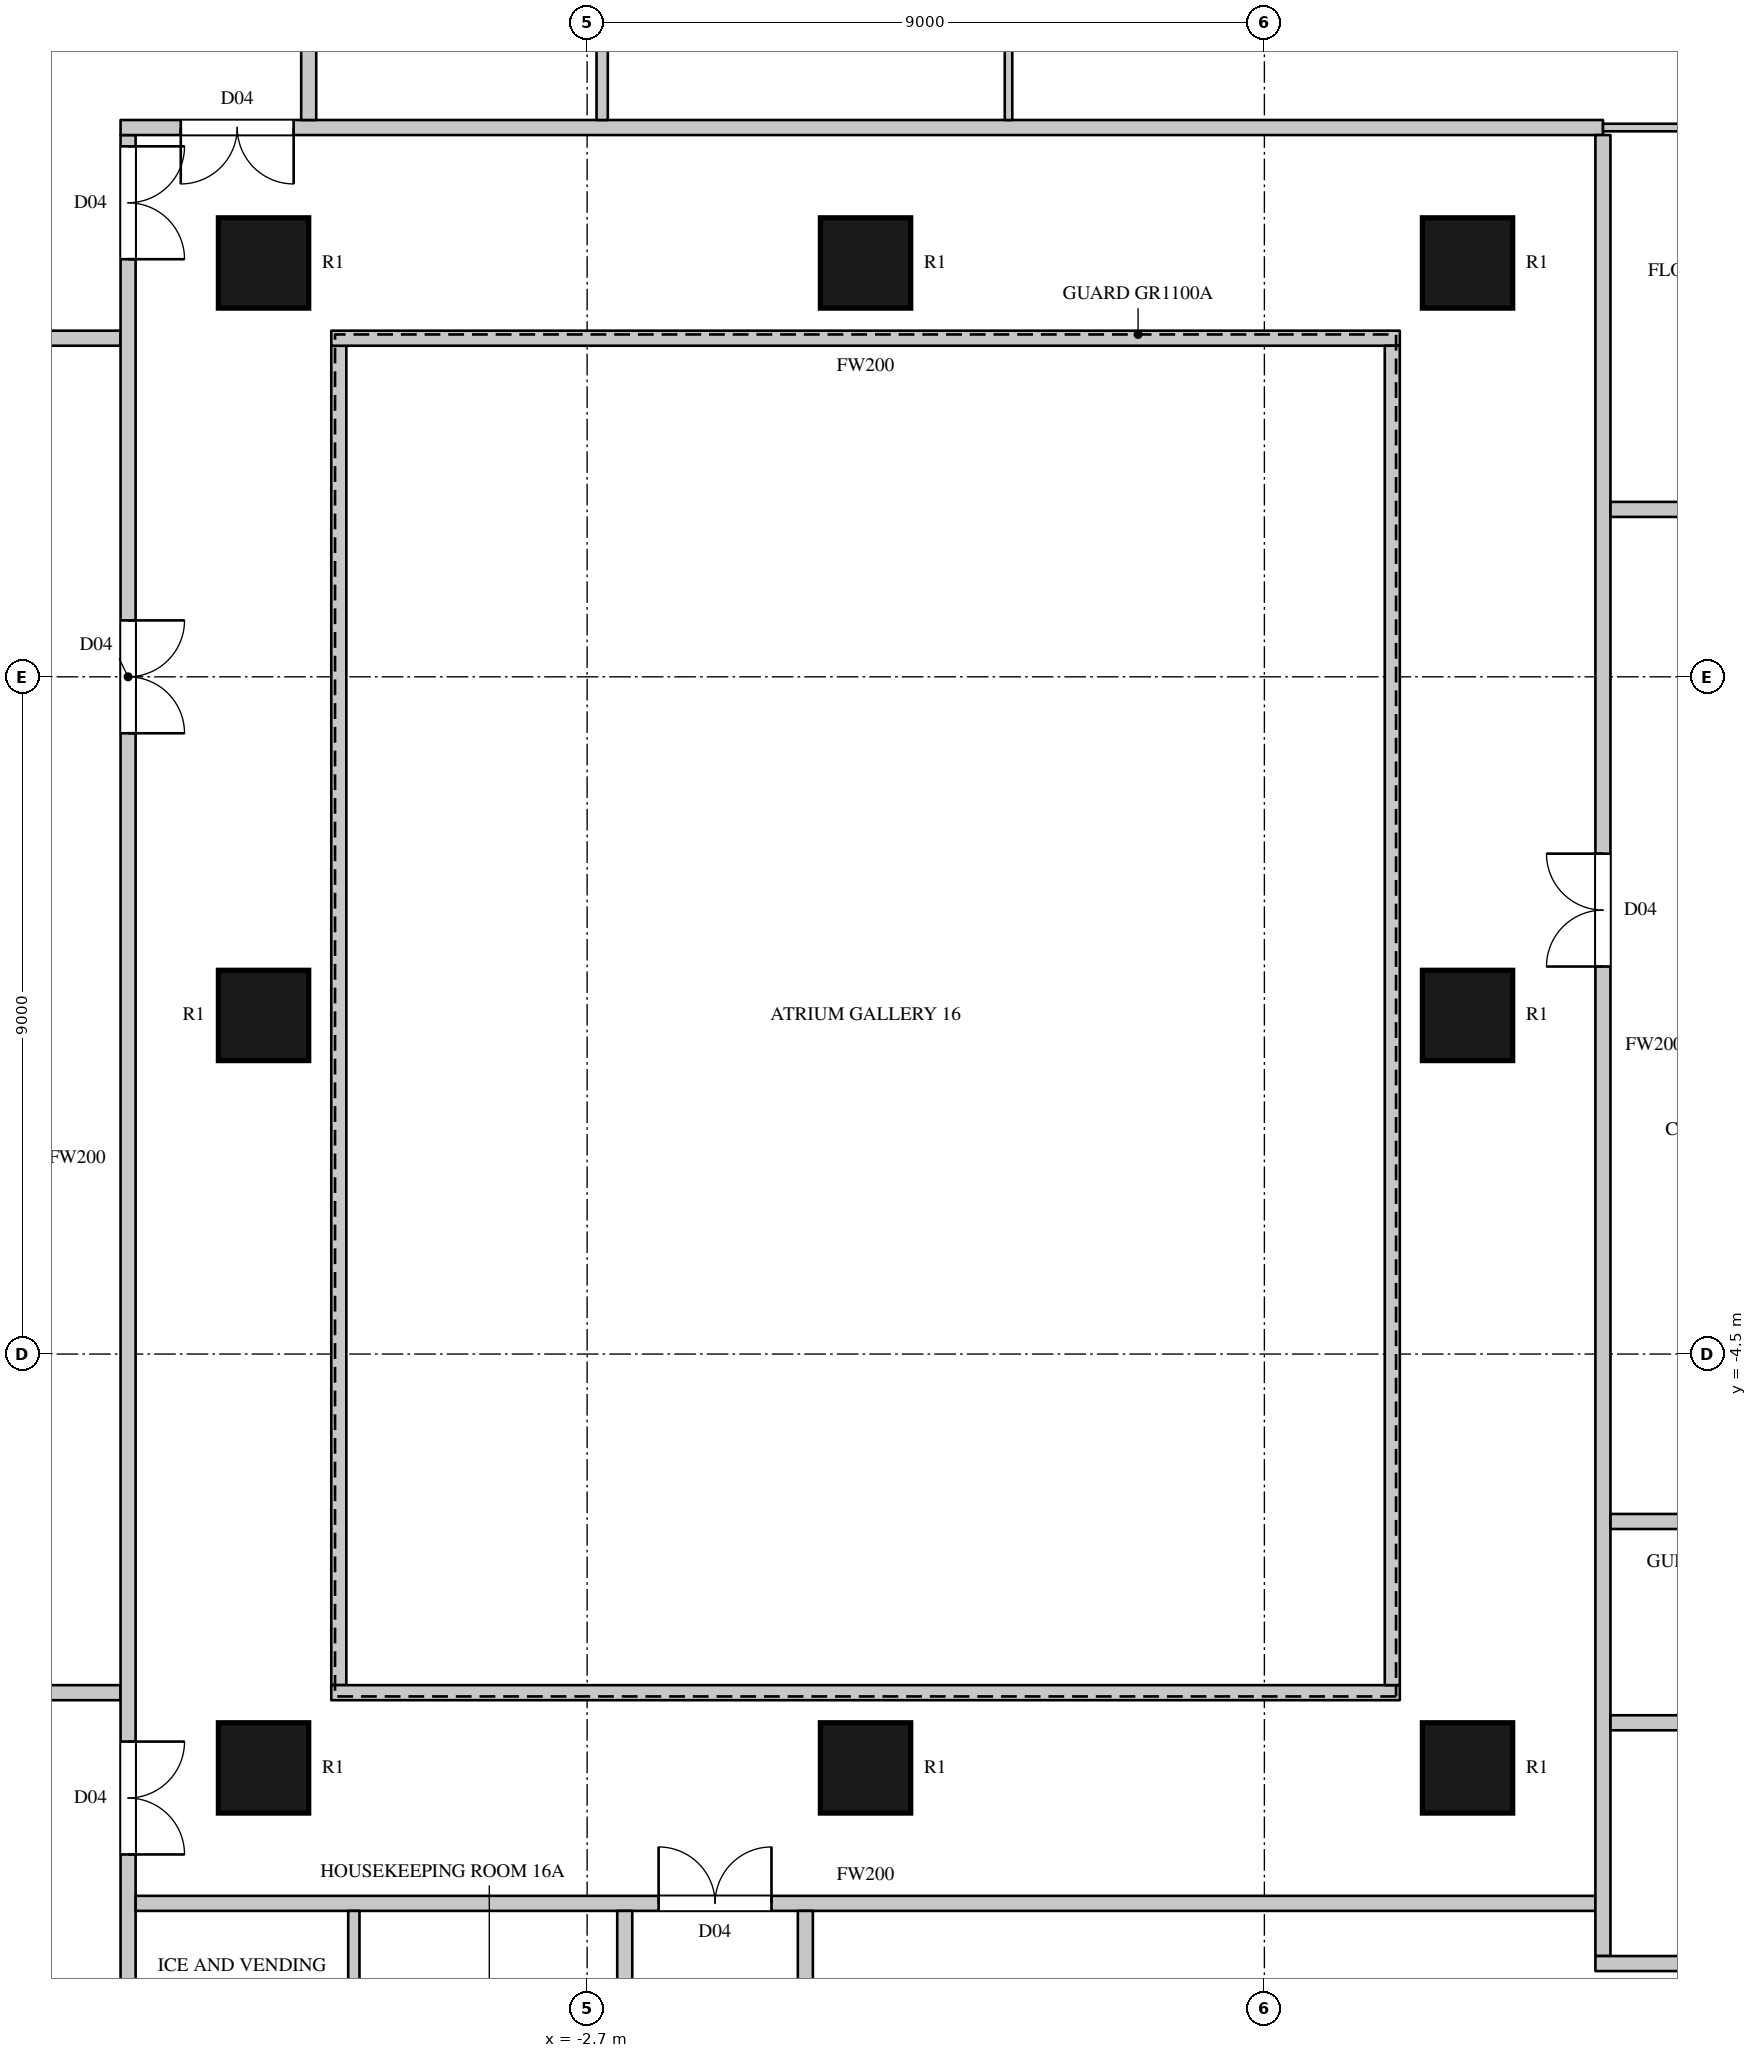
"""IFC4 building model, lengths in metres.
Left out: names, types, materials, properties, quantities, classifications, styles, units other than length and angle.
Written with IfcOpenShell. Run it as: python <this file> out.ifc"""

import sys

from ifc_helpers import new_model, si_unit, direction, frame, frame_2d, origin, origin_2d, place, context, subcontext, project, spatial, rectangle, circle, extrude, element, fill, save


model = new_model("IFC4")
c1 = context("Model", 3, precision=1e-05, world=origin(), true_north=direction((0.0, 1.0)))
c2 = subcontext(c1, "Body", "Model", "MODEL_VIEW")
j1 = project(units=[si_unit("LENGTHUNIT", "METRE"), si_unit("PLANEANGLEUNIT", "RADIAN")], contexts=[c1])
p1 = place(None, origin())
s1 = spatial("IfcSite", under=j1, at=p1, CompositionType="ELEMENT")
p2 = place(p1, origin())
s2 = spatial("IfcBuilding", under=s1, at=p2, CompositionType="ELEMENT")
p3 = place(p2, frame((0.0, 0.0, 87.9)))
s3 = spatial("IfcBuildingStorey", under=s2, at=p3, CompositionType="ELEMENT", Elevation=87.9)
for number, where, z_axis, x_axis in (
    (1, (-7.0, -10.0, 0.0), (0.0, 0.0, 1.0), (1.0, 0.0, 0.0)),
    (2, (-7.0, 0.0, 0.0), (0.0, 0.0, 1.0), (1.0, 0.0, 0.0)),
    (3, (-7.0, 10.0, 0.0), (0.0, 0.0, 1.0), (1.0, 0.0, 0.0)),
    (4, (1.0, -10.0, 0.0), (0.0, 0.0, 1.0), (1.0, 0.0, 0.0)),
    (5, (1.0, 10.0, 0.0), (0.0, 0.0, 1.0), (1.0, 0.0, 0.0)),
    (6, (9.0, -10.0, 0.0), (0.0, 0.0, 1.0), (1.0, 0.0, 0.0)),
    (7, (9.0, 0.0, 0.0), (0.0, 0.0, 1.0), (1.0, 0.0, 0.0)),
    (8, (9.0, 10.0, 0.0), (0.0, 0.0, 1.0), (1.0, 0.0, 0.0)),
):
    element("IfcColumn", number, at=place(p3, frame(where, z_axis=z_axis, x_axis=x_axis)), inside=s3, PredefinedType="COLUMN", context=c2, shape_type="SweptSolid", body=[
        extrude(circle(Radius=0.6, at=origin_2d()), origin(), (0.0, 0.0, 1.0), 3.6),
    ])
p4 = place(p3, frame((-13.97, -9.0, 0.0), z_axis=(0.0, 0.0, 1.0), x_axis=(1.0, 0.0, 0.0)))
e9 = element("IfcWall", 9, at=p4, inside=s3, PredefinedType="PARTITIONING", context=c2, shape_type="SweptSolid", body=[
    extrude(rectangle(XDim=5.07, YDim=0.2, at=frame_2d((2.535, 0.0))), origin(), (0.0, 0.0, 1.0), 3.3),
])
p5 = place(p4, frame((0.4, 0.0, 0.0)))
e10 = element("IfcOpeningElement", 10, at=p5, cuts=e9, PredefinedType="OPENING", context=c2, shape_type="SweptSolid", body=[
    extrude(rectangle(XDim=1.5, YDim=2.2, at=frame_2d((0.75, 1.1))), frame((0.0, 0.11, 0.0), z_axis=(0.0, -1.0, 0.0), x_axis=(1.0, 0.0, 0.0)), (0.0, 0.0, 1.0), 0.22),
])
p6 = place(p4, frame((2.05, 0.0, 0.0)))
e11 = element("IfcOpeningElement", 11, at=p6, cuts=e9, PredefinedType="OPENING", context=c2, shape_type="SweptSolid", body=[
    extrude(rectangle(XDim=1.5, YDim=2.2, at=frame_2d((0.75, 1.1))), frame((0.0, 0.11, 0.0), z_axis=(0.0, -1.0, 0.0), x_axis=(1.0, 0.0, 0.0)), (0.0, 0.0, 1.0), 0.22),
])
p7 = place(p3, frame((-13.97, 9.0, 0.0), z_axis=(0.0, 0.0, 1.0), x_axis=(1.0, 0.0, 0.0)))
e12 = element("IfcWall", 12, at=p7, inside=s3, PredefinedType="PARTITIONING", context=c2, shape_type="SweptSolid", body=[
    extrude(rectangle(XDim=5.07, YDim=0.2, at=frame_2d((2.535, 0.0))), origin(), (0.0, 0.0, 1.0), 3.3),
])
p8 = place(p3, frame((-8.8, -15.5, 0.0), z_axis=(0.0, 0.0, 1.0), x_axis=(0.0, 1.0, 0.0)))
e13 = element("IfcWall", 13, at=p8, inside=s3, PredefinedType="PARTITIONING", context=c2, shape_type="SweptSolid", body=[
    extrude(rectangle(XDim=27.2, YDim=0.2, at=frame_2d((13.6, 0.0))), origin(), (0.0, 0.0, 1.0), 3.3),
])
p9 = place(p8, frame((19.25, 0.0, 0.0)))
e14 = element("IfcOpeningElement", 14, at=p9, cuts=e13, PredefinedType="OPENING", context=c2, shape_type="SweptSolid", body=[
    extrude(rectangle(XDim=1.5, YDim=2.2, at=frame_2d((0.75, 1.1))), frame((0.0, 0.11, 0.0), z_axis=(0.0, -1.0, 0.0), x_axis=(1.0, 0.0, 0.0)), (0.0, 0.0, 1.0), 0.22),
])
p10 = place(p8, frame((4.35, 0.0, 0.0)))
e15 = element("IfcOpeningElement", 15, at=p10, cuts=e13, PredefinedType="OPENING", context=c2, shape_type="SweptSolid", body=[
    extrude(rectangle(XDim=1.5, YDim=2.2, at=frame_2d((0.75, 1.1))), frame((0.0, 0.11, 0.0), z_axis=(0.0, -1.0, 0.0), x_axis=(1.0, 0.0, 0.0)), (0.0, 0.0, 1.0), 0.22),
])
p11 = place(p8, frame((25.55, 0.0, 0.0)))
e16 = element("IfcOpeningElement", 16, at=p11, cuts=e13, PredefinedType="OPENING", context=c2, shape_type="SweptSolid", body=[
    extrude(rectangle(XDim=1.5, YDim=2.2, at=frame_2d((0.75, 1.1))), frame((0.0, 0.11, 0.0), z_axis=(0.0, -1.0, 0.0), x_axis=(1.0, 0.0, 0.0)), (0.0, 0.0, 1.0), 0.22),
])
p12 = place(p8, frame((0.15, 0.0, 0.0)))
e17 = element("IfcOpeningElement", 17, at=p12, cuts=e13, PredefinedType="OPENING", context=c2, shape_type="SweptSolid", body=[
    extrude(rectangle(XDim=0.9, YDim=2.2, at=frame_2d((0.45, 1.1))), frame((0.0, 0.11, 0.0), z_axis=(0.0, -1.0, 0.0), x_axis=(1.0, 0.0, 0.0)), (0.0, 0.0, 1.0), 0.22),
])
p13 = place(p3, frame((-8.7, -11.8, 0.0), z_axis=(0.0, 0.0, 1.0), x_axis=(1.0, 0.0, 0.0)))
e18 = element("IfcWall", 18, at=p13, inside=s3, PredefinedType="PARTITIONING", context=c2, shape_type="SweptSolid", body=[
    extrude(rectangle(XDim=19.4, YDim=0.2, at=frame_2d((9.7, 0.0))), origin(), (0.0, 0.0, 1.0), 3.3),
])
p14 = place(p13, frame((6.95, 0.0, 0.0)))
e19 = element("IfcOpeningElement", 19, at=p14, cuts=e18, PredefinedType="OPENING", context=c2, shape_type="SweptSolid", body=[
    extrude(rectangle(XDim=1.5, YDim=2.2, at=frame_2d((0.75, 1.1))), frame((0.0, 0.11, 0.0), z_axis=(0.0, -1.0, 0.0), x_axis=(1.0, 0.0, 0.0)), (0.0, 0.0, 1.0), 0.22),
])
p15 = place(p3, frame((-8.9, 11.8, 0.0), z_axis=(0.0, 0.0, 1.0), x_axis=(1.0, 0.0, 0.0)))
e20 = element("IfcWall", 20, at=p15, inside=s3, PredefinedType="PARTITIONING", context=c2, shape_type="SweptSolid", body=[
    extrude(rectangle(XDim=19.7, YDim=0.2, at=frame_2d((9.85, 0.0))), origin(), (0.0, 0.0, 1.0), 3.3),
])
p16 = place(p15, frame((0.8, 0.0, 0.0)))
e21 = element("IfcOpeningElement", 21, at=p16, cuts=e20, PredefinedType="OPENING", context=c2, shape_type="SweptSolid", body=[
    extrude(rectangle(XDim=1.5, YDim=2.2, at=frame_2d((0.75, 1.1))), frame((0.0, 0.11, 0.0), z_axis=(0.0, -1.0, 0.0), x_axis=(1.0, 0.0, 0.0)), (0.0, 0.0, 1.0), 0.22),
])
p17 = place(p3, frame((-6.4, 11.9, 0.0), z_axis=(0.0, 0.0, 1.0), x_axis=(0.0, 1.0, 0.0)))
e22 = element("IfcWall", 22, at=p17, inside=s3, PredefinedType="PARTITIONING", context=c2, shape_type="SweptSolid", body=[
    extrude(rectangle(XDim=3.6, YDim=0.2, at=frame_2d((1.8, 0.0))), origin(), (0.0, 0.0, 1.0), 3.3),
])
p18 = place(p17, frame((2.55, 0.0, 0.0)))
e23 = element("IfcOpeningElement", 23, at=p18, cuts=e22, PredefinedType="OPENING", context=c2, shape_type="SweptSolid", body=[
    extrude(rectangle(XDim=0.9, YDim=2.2, at=frame_2d((0.45, 1.1))), frame((0.0, 0.11, 0.0), z_axis=(0.0, -1.0, 0.0), x_axis=(1.0, 0.0, 0.0)), (0.0, 0.0, 1.0), 0.22),
])
p19 = place(p3, frame((-6.0, -8.9, 0.0), z_axis=(0.0, 0.0, 1.0), x_axis=(0.0, 1.0, 0.0)))
e24 = element("IfcWall", 24, at=p19, inside=s3, PredefinedType="PARTITIONING", context=c2, shape_type="SweptSolid", body=[
    extrude(rectangle(XDim=17.8, YDim=0.2, at=frame_2d((8.9, 0.0))), origin(), (0.0, 0.0, 1.0), 3.3),
])
for number, where, z_axis, x_axis in (
    (25, (-6.1, -9.0, 0.0), (0.0, 0.0, 1.0), (1.0, 0.0, 0.0)),
    (26, (-6.1, 9.0, 0.0), (0.0, 0.0, 1.0), (1.0, 0.0, 0.0)),
):
    element("IfcWall", number, at=place(p3, frame(where, z_axis=z_axis, x_axis=x_axis)), inside=s3, PredefinedType="PARTITIONING", context=c2, shape_type="SweptSolid", body=[
        extrude(rectangle(XDim=14.2, YDim=0.2, at=frame_2d((7.1, 0.0))), origin(), (0.0, 0.0, 1.0), 3.3),
    ])
p20 = place(p3, frame((-2.2, -15.5, 0.0), z_axis=(0.0, 0.0, 1.0), x_axis=(0.0, 1.0, 0.0)))
e27 = element("IfcWall", 27, at=p20, inside=s3, PredefinedType="PARTITIONING", context=c2, shape_type="SweptSolid", body=[
    extrude(rectangle(XDim=3.6, YDim=0.2, at=frame_2d((1.8, 0.0))), origin(), (0.0, 0.0, 1.0), 3.3),
])
p21 = place(p3, frame((0.2, -15.5, 0.0), z_axis=(0.0, 0.0, 1.0), x_axis=(0.0, 1.0, 0.0)))
e28 = element("IfcWall", 28, at=p21, inside=s3, PredefinedType="PARTITIONING", context=c2, shape_type="SweptSolid", body=[
    extrude(rectangle(XDim=3.6, YDim=0.2, at=frame_2d((1.8, 0.0))), origin(), (0.0, 0.0, 1.0), 3.3),
])
p22 = place(p21, frame((0.15, 0.0, 0.0)))
e29 = element("IfcOpeningElement", 29, at=p22, cuts=e28, PredefinedType="OPENING", context=c2, shape_type="SweptSolid", body=[
    extrude(rectangle(XDim=0.9, YDim=2.2, at=frame_2d((0.45, 1.1))), frame((0.0, 0.11, 0.0), z_axis=(0.0, -1.0, 0.0), x_axis=(1.0, 0.0, 0.0)), (0.0, 0.0, 1.0), 0.22),
])
p23 = place(p3, frame((8.0, -8.9, 0.0), z_axis=(0.0, 0.0, 1.0), x_axis=(0.0, 1.0, 0.0)))
e30 = element("IfcWall", 30, at=p23, inside=s3, PredefinedType="PARTITIONING", context=c2, shape_type="SweptSolid", body=[
    extrude(rectangle(XDim=17.8, YDim=0.2, at=frame_2d((8.9, 0.0))), origin(), (0.0, 0.0, 1.0), 3.3),
])
p24 = place(p3, frame((10.799, -12.5, 0.0), z_axis=(0.0, 0.0, 1.0), x_axis=(0.0, 1.0, 0.0)))
e31 = element("IfcWall", 31, at=p24, inside=s3, PredefinedType="PARTITIONING", context=c2, shape_type="SweptSolid", body=[
    extrude(rectangle(XDim=24.2, YDim=0.2, at=frame_2d((12.1, 0.0))), origin(), (0.0, 0.0, 1.0), 3.3),
])
p25 = place(p24, frame((13.15, 0.0, 0.0)))
e32 = element("IfcOpeningElement", 32, at=p25, cuts=e31, PredefinedType="OPENING", context=c2, shape_type="SweptSolid", body=[
    extrude(rectangle(XDim=1.5, YDim=2.2, at=frame_2d((0.75, 1.1))), frame((0.0, 0.11, 0.0), z_axis=(0.0, -1.0, 0.0), x_axis=(1.0, 0.0, 0.0)), (0.0, 0.0, 1.0), 0.22),
])
p26 = place(p3, frame((10.699, -12.6, 0.0), z_axis=(0.0, 0.0, 1.0), x_axis=(1.0, 0.0, 0.0)))
e33 = element("IfcWall", 33, at=p26, inside=s3, PredefinedType="PARTITIONING", context=c2, shape_type="SweptSolid", body=[
    extrude(rectangle(XDim=3.601, YDim=0.2, at=frame_2d((1.801, 0.0))), origin(), (0.0, 0.0, 1.0), 3.3),
])
p27 = place(p3, frame((10.9, -9.4, 0.0), z_axis=(0.0, 0.0, 1.0), x_axis=(1.0, 0.0, 0.0)))
e34 = element("IfcWall", 34, at=p27, inside=s3, PredefinedType="PARTITIONING", context=c2, shape_type="SweptSolid", body=[
    extrude(rectangle(XDim=3.4, YDim=0.2, at=frame_2d((1.7, 0.0))), origin(), (0.0, 0.0, 1.0), 3.3),
])
p28 = place(p27, frame((1.5, 0.0, 0.0)))
e35 = element("IfcOpeningElement", 35, at=p28, cuts=e34, PredefinedType="OPENING", context=c2, shape_type="SweptSolid", body=[
    extrude(rectangle(XDim=1.6, YDim=2.4, at=frame_2d((0.8, 1.2))), frame((0.0, 0.11, 0.0), z_axis=(0.0, -1.0, 0.0), x_axis=(1.0, 0.0, 0.0)), (0.0, 0.0, 1.0), 0.22),
])
p29 = place(p3, frame((10.9, -6.725, 0.0), z_axis=(0.0, 0.0, 1.0), x_axis=(1.0, 0.0, 0.0)))
e36 = element("IfcWall", 36, at=p29, inside=s3, PredefinedType="PARTITIONING", context=c2, shape_type="SweptSolid", body=[
    extrude(rectangle(XDim=3.4, YDim=0.2, at=frame_2d((1.7, 0.0))), origin(), (0.0, 0.0, 1.0), 3.3),
])
p30 = place(p3, frame((10.9, 6.725, 0.0), z_axis=(0.0, 0.0, 1.0), x_axis=(1.0, 0.0, 0.0)))
e37 = element("IfcWall", 37, at=p30, inside=s3, PredefinedType="PARTITIONING", context=c2, shape_type="SweptSolid", body=[
    extrude(rectangle(XDim=3.4, YDim=0.2, at=frame_2d((1.7, 0.0))), origin(), (0.0, 0.0, 1.0), 3.3),
])
p31 = place(p30, frame((2.1, 0.0, 0.0)))
e38 = element("IfcOpeningElement", 38, at=p31, cuts=e37, PredefinedType="OPENING", context=c2, shape_type="SweptSolid", body=[
    extrude(rectangle(XDim=0.95, YDim=2.2, at=frame_2d((0.475, 1.1))), frame((0.0, 0.11, 0.0), z_axis=(0.0, -1.0, 0.0), x_axis=(1.0, 0.0, 0.0)), (0.0, 0.0, 1.0), 0.22),
])
p32 = place(p3, frame((-5.8, -15.5, 0.0), z_axis=(0.0, 0.0, 1.0), x_axis=(0.0, 1.0, 0.0)))
e39 = element("IfcWall", 39, at=p32, inside=s3, PredefinedType="PARTITIONING", context=c2, shape_type="SweptSolid", body=[
    extrude(rectangle(XDim=3.6, YDim=0.15, at=frame_2d((1.8, 0.0))), origin(), (0.0, 0.0, 1.0), 3.3),
])
p33 = place(p3, frame((-2.5, 11.9, 0.0), z_axis=(0.0, 0.0, 1.0), x_axis=(0.0, 1.0, 0.0)))
e40 = element("IfcWall", 40, at=p33, inside=s3, PredefinedType="PARTITIONING", context=c2, shape_type="SweptSolid", body=[
    extrude(rectangle(XDim=3.6, YDim=0.15, at=frame_2d((1.8, 0.0))), origin(), (0.0, 0.0, 1.0), 2.75),
])
p34 = place(p3, frame((2.9, 11.9, 0.0), z_axis=(0.0, 0.0, 1.0), x_axis=(0.0, 1.0, 0.0)))
e41 = element("IfcWall", 41, at=p34, inside=s3, PredefinedType="PARTITIONING", context=c2, shape_type="SweptSolid", body=[
    extrude(rectangle(XDim=3.6, YDim=0.1, at=frame_2d((1.8, 0.0))), origin(), (0.0, 0.0, 1.0), 3.3),
])
p35 = place(p3, frame((10.8, 11.8, 0.0), z_axis=(0.0, 0.0, 1.0), x_axis=(1.0, 0.0, 0.0)))
e42 = element("IfcWall", 42, at=p35, inside=s3, PredefinedType="PARTITIONING", context=c2, shape_type="SweptSolid", body=[
    extrude(rectangle(XDim=3.3, YDim=0.1, at=frame_2d((1.65, 0.0))), origin(), (0.0, 0.0, 1.0), 3.3),
])
p36 = place(p9, origin())
e43 = element("IfcDoor", 43, at=p36, inside=s3, OperationType="DOUBLE_DOOR_SINGLE_SWING", PredefinedType="DOOR", context=c2, shape_type="SweptSolid", body=[
    extrude(rectangle(XDim=1.5, YDim=2.2, at=frame_2d((0.75, 1.1))), frame((0.0, 0.025, 0.0), z_axis=(0.0, -1.0, 0.0), x_axis=(1.0, 0.0, 0.0)), (0.0, 0.0, 1.0), 0.05),
])
fill(e14, e43)
p37 = place(p10, origin())
e44 = element("IfcDoor", 44, at=p37, inside=s3, OperationType="DOUBLE_DOOR_SINGLE_SWING", PredefinedType="DOOR", context=c2, shape_type="SweptSolid", body=[
    extrude(rectangle(XDim=1.5, YDim=2.2, at=frame_2d((0.75, 1.1))), frame((0.0, 0.025, 0.0), z_axis=(0.0, -1.0, 0.0), x_axis=(1.0, 0.0, 0.0)), (0.0, 0.0, 1.0), 0.05),
])
fill(e15, e44)
p38 = place(p11, origin())
e45 = element("IfcDoor", 45, at=p38, inside=s3, OperationType="DOUBLE_DOOR_SINGLE_SWING", PredefinedType="DOOR", context=c2, shape_type="SweptSolid", body=[
    extrude(rectangle(XDim=1.5, YDim=2.2, at=frame_2d((0.75, 1.1))), frame((0.0, 0.025, 0.0), z_axis=(0.0, -1.0, 0.0), x_axis=(1.0, 0.0, 0.0)), (0.0, 0.0, 1.0), 0.05),
])
fill(e16, e45)
p39 = place(p14, origin())
e46 = element("IfcDoor", 46, at=p39, inside=s3, OperationType="DOUBLE_DOOR_SINGLE_SWING", PredefinedType="DOOR", context=c2, shape_type="SweptSolid", body=[
    extrude(rectangle(XDim=1.5, YDim=2.2, at=frame_2d((0.75, 1.1))), frame((0.0, 0.025, 0.0), z_axis=(0.0, -1.0, 0.0), x_axis=(1.0, 0.0, 0.0)), (0.0, 0.0, 1.0), 0.05),
])
fill(e19, e46)
p40 = place(p16, origin())
e47 = element("IfcDoor", 47, at=p40, inside=s3, OperationType="DOUBLE_DOOR_SINGLE_SWING", PredefinedType="DOOR", context=c2, shape_type="SweptSolid", body=[
    extrude(rectangle(XDim=1.5, YDim=2.2, at=frame_2d((0.75, 1.1))), frame((0.0, 0.025, 0.0), z_axis=(0.0, -1.0, 0.0), x_axis=(1.0, 0.0, 0.0)), (0.0, 0.0, 1.0), 0.05),
])
fill(e21, e47)
p41 = place(p25, origin())
e48 = element("IfcDoor", 48, at=p41, inside=s3, OperationType="DOUBLE_DOOR_SINGLE_SWING", PredefinedType="DOOR", context=c2, shape_type="SweptSolid", body=[
    extrude(rectangle(XDim=1.5, YDim=2.2, at=frame_2d((0.75, 1.1))), frame((0.0, 0.025, 0.0), z_axis=(0.0, -1.0, 0.0), x_axis=(1.0, 0.0, 0.0)), (0.0, 0.0, 1.0), 0.05),
])
fill(e32, e48)
save(model, sys.argv[1])
